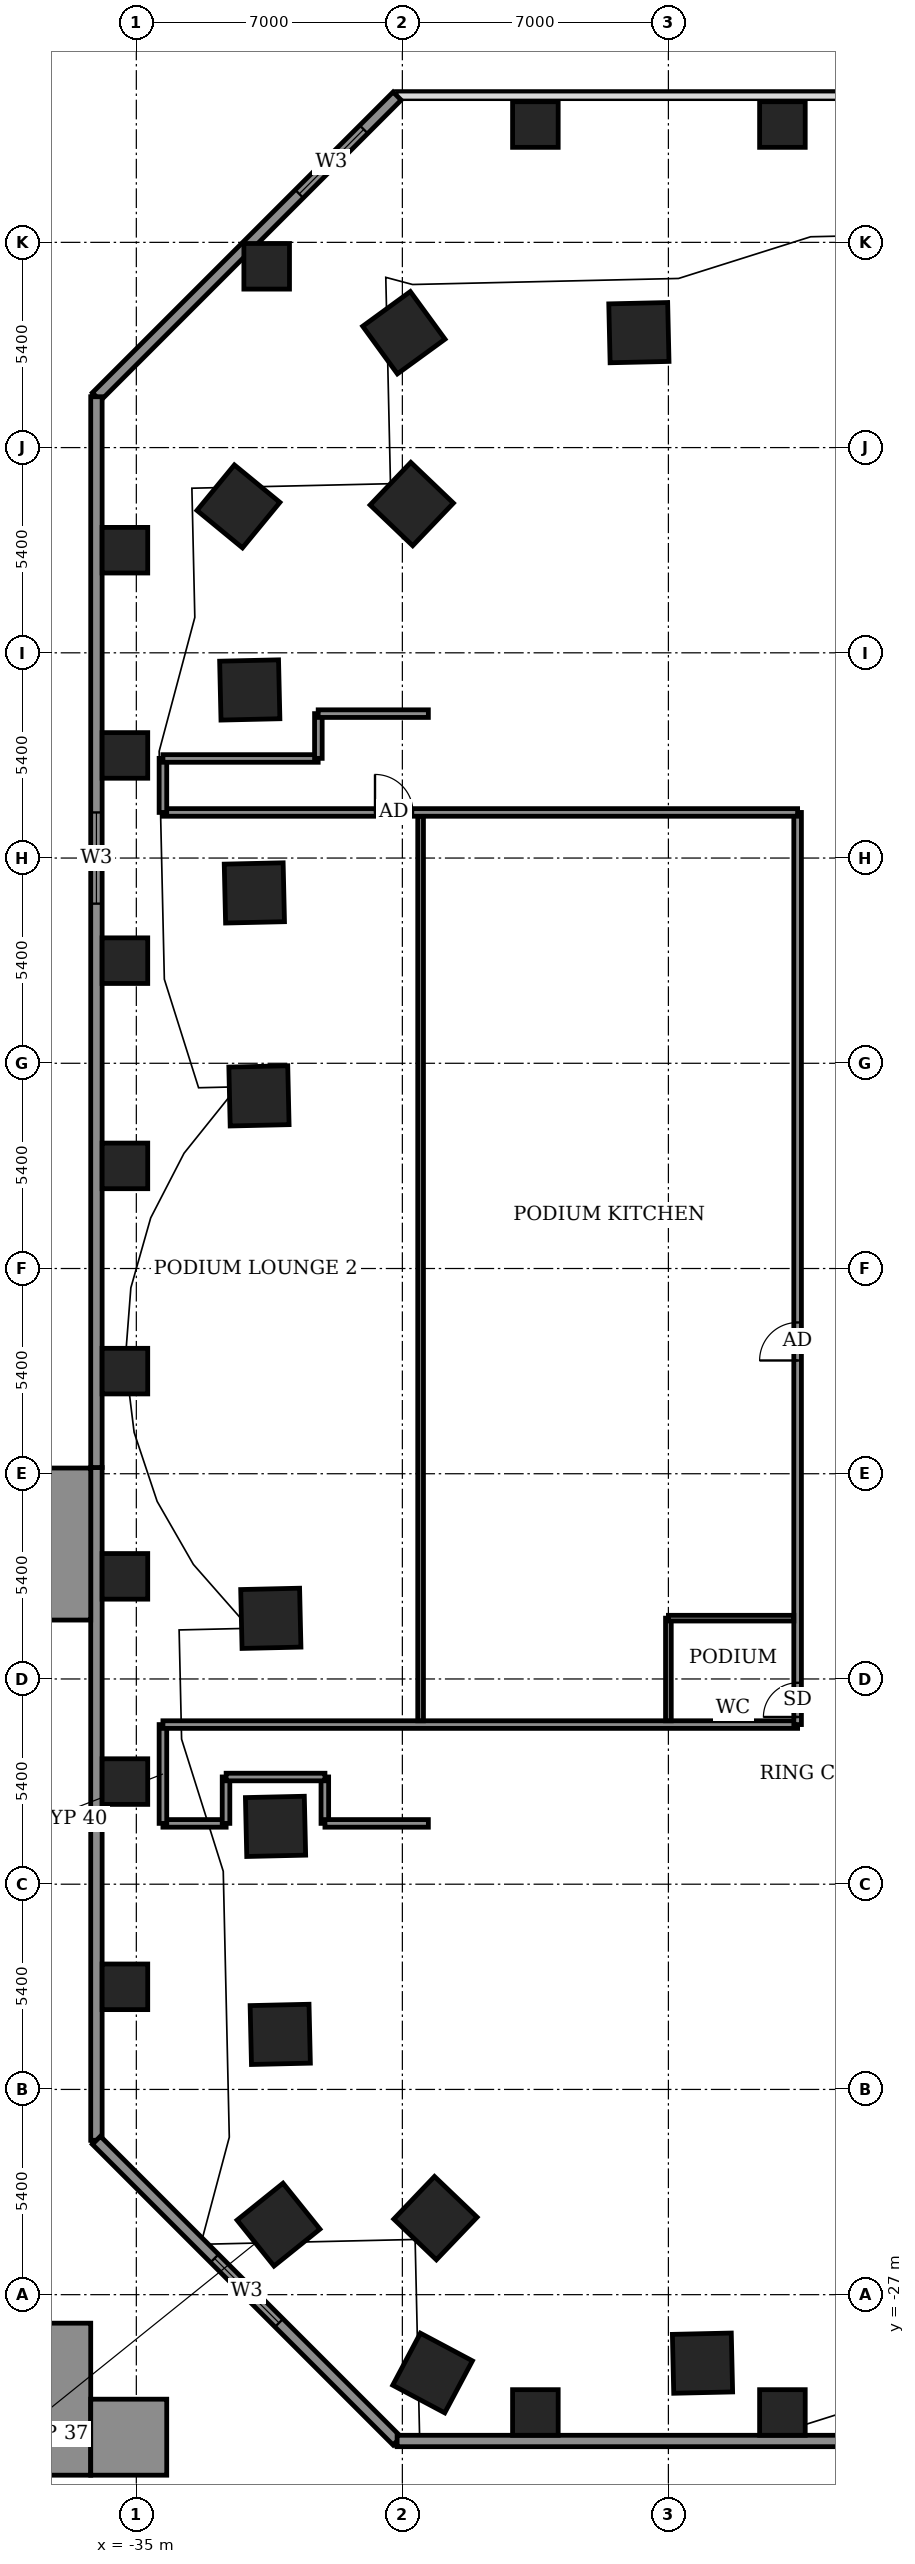
"""IFC4 building model, lengths in metres.
Left out: names, types, materials, properties, quantities, classifications, styles, units other than length and angle.
Written with IfcOpenShell. Run it as: python <this file> out.ifc"""

import sys

from ifc_helpers import new_model, si_unit, direction, frame, frame_2d, origin, origin_2d, place, context, subcontext, project, spatial, rectangle, extrude, element, fill, save


model = new_model("IFC4")
c1 = context("Model", 3, precision=1e-05, world=origin(), true_north=direction((0.0, 1.0)))
c2 = subcontext(c1, "Body", "Model", "MODEL_VIEW")
j1 = project(units=[si_unit("LENGTHUNIT", "METRE"), si_unit("PLANEANGLEUNIT", "RADIAN")], contexts=[c1])
p1 = place(None, origin())
s1 = spatial("IfcSite", under=j1, at=p1, CompositionType="ELEMENT")
p2 = place(p1, origin())
s2 = spatial("IfcBuilding", under=s1, at=p2, CompositionType="ELEMENT")
p3 = place(p2, frame((0.0, 0.0, 25.0)))
s3 = spatial("IfcBuildingStorey", under=s2, at=p3, CompositionType="ELEMENT", Elevation=25.0)
for number, where, z_axis, x_axis in (
    (1, (-31.461, -9.204, -0.55), (0.0, 0.0, 1.0), (0.023, -1.0, 0.0)),
    (2, (-31.337, -14.678, -0.55), (0.0, 0.0, 1.0), (0.023, -1.0, 0.0)),
    (3, (-31.213, -20.151, -0.55), (0.0, 0.0, 1.0), (0.023, -1.0, 0.0)),
    (4, (-31.259, -25.157, -0.55), (0.0, 0.0, 1.0), (0.627, -0.779, 0.0)),
    (5, (-27.13, -24.987, -0.55), (0.0, 0.0, 1.0), (0.723, -0.691, 0.0)),
    (6, (-27.205, -29.062, -0.55), (0.0, 0.0, 1.0), (0.883, -0.469, 0.0)),
    (7, (-20.103, -28.802, -0.55), (0.0, 0.0, 1.0), (1.0, 0.023, 0.0)),
    (8, (-21.776, 24.624, -0.55), (0.0, 0.0, 1.0), (-1.0, -0.023, 0.0)),
    (9, (-27.961, 24.623, -0.55), (0.0, 0.0, 1.0), (-0.808, -0.589, 0.0)),
    (10, (-27.753, 20.115, -0.55), (0.0, 0.0, 1.0), (-0.691, -0.723, 0.0)),
    (11, (-32.313, 20.053, -0.55), (0.0, 0.0, 1.0), (-0.635, -0.772, 0.0)),
    (12, (-32.015, 15.223, -0.55), (0.0, 0.0, 1.0), (0.023, -1.0, 0.0)),
    (13, (-31.894, 9.883, -0.55), (0.0, 0.0, 1.0), (0.023, -1.0, 0.0)),
    (14, (-31.773, 4.542, -0.55), (0.0, 0.0, 1.0), (0.023, -1.0, 0.0)),
):
    element("IfcColumn", number, at=place(p3, frame(where, z_axis=z_axis, x_axis=x_axis)), inside=s3, PredefinedType="COLUMN", context=c2, shape_type="SweptSolid", body=[
        extrude(rectangle(XDim=1.55, YDim=1.55, at=origin_2d()), origin(), (0.0, 0.0, 1.0), 4.5),
    ])
for number, where, z_axis, x_axis in (
    (15, (-24.5, -30.1, -0.55), (0.0, 0.0, 1.0), (1.0, 0.0, 0.0)),
    (16, (-24.5, 30.1, -0.55), (0.0, 0.0, 1.0), (1.0, 0.0, 0.0)),
    (17, (-18.0, -30.1, -0.55), (0.0, 0.0, 1.0), (1.0, 0.0, 0.0)),
    (18, (-18.0, 30.1, -0.55), (0.0, 0.0, 1.0), (1.0, 0.0, 0.0)),
    (19, (-35.3, -18.9, -0.55), (0.0, 0.0, 1.0), (1.0, 0.0, 0.0)),
    (20, (-35.3, -13.5, -0.55), (0.0, 0.0, 1.0), (1.0, 0.0, 0.0)),
    (21, (-35.3, -8.1, -0.55), (0.0, 0.0, 1.0), (1.0, 0.0, 0.0)),
    (22, (-35.3, -2.7, -0.55), (0.0, 0.0, 1.0), (1.0, 0.0, 0.0)),
    (23, (-35.3, 2.7, -0.55), (0.0, 0.0, 1.0), (1.0, 0.0, 0.0)),
    (24, (-35.3, 8.1, -0.55), (0.0, 0.0, 1.0), (1.0, 0.0, 0.0)),
    (25, (-35.3, 13.5, -0.55), (0.0, 0.0, 1.0), (1.0, 0.0, 0.0)),
    (26, (-35.3, 18.9, -0.55), (0.0, 0.0, 1.0), (1.0, 0.0, 0.0)),
    (27, (-31.57, 26.37, -0.55), (0.0, 0.0, 1.0), (1.0, 0.0, 0.0)),
):
    element("IfcColumn", number, at=place(p3, frame(where, z_axis=z_axis, x_axis=x_axis)), inside=s3, PredefinedType="COLUMN", context=c2, shape_type="SweptSolid", body=[
        extrude(rectangle(XDim=1.2, YDim=1.2, at=origin_2d()), origin(), (0.0, 0.0, 1.0), 4.5),
    ])
p4 = place(p3, frame((-28.138, 30.85, 0.0), z_axis=(0.0, 0.0, 1.0), x_axis=(-0.707106781187, -0.707106781187, 0.0)))
e28 = element("IfcWall", 28, at=p4, inside=s3, PredefinedType="SOLIDWALL", context=c2, shape_type="SweptSolid", body=[
    extrude(rectangle(XDim=11.189, YDim=0.3, at=frame_2d((5.595, 0.0))), origin(), (0.0, 0.0, 1.0), 3.95),
])
p5 = place(p4, frame((1.242, 0.0, 0.9)))
e29 = element("IfcOpeningElement", 29, at=p5, cuts=e28, PredefinedType="OPENING", context=c2, shape_type="SweptSolid", body=[
    extrude(rectangle(XDim=2.4, YDim=1.8, at=frame_2d((1.2, 0.9))), frame((0.0, 0.16, 0.0), z_axis=(0.0, -1.0, 0.0), x_axis=(1.0, 0.0, 0.0)), (0.0, 0.0, 1.0), 0.32),
])
p6 = place(p3, frame((-36.05, -5.236, 0.0), z_axis=(0.0, 0.0, 1.0), x_axis=(0.0, -1.0, 0.0)))
e30 = element("IfcWall", 30, at=p6, inside=s3, PredefinedType="SOLIDWALL", context=c2, shape_type="SweptSolid", body=[
    extrude(rectangle(XDim=17.702, YDim=0.3, at=frame_2d((8.851, 0.0))), origin(), (0.0, 0.0, 1.0), 3.95),
])
p7 = place(p3, frame((-36.05, 22.938, 0.0), z_axis=(0.0, 0.0, 1.0), x_axis=(0.0, -1.0, 0.0)))
e31 = element("IfcWall", 31, at=p7, inside=s3, PredefinedType="SOLIDWALL", context=c2, shape_type="SweptSolid", body=[
    extrude(rectangle(XDim=28.174, YDim=0.3, at=frame_2d((14.087, 0.0))), origin(), (0.0, 0.0, 1.0), 3.95),
])
p8 = place(p7, frame((10.938, 0.0, 0.9)))
e32 = element("IfcOpeningElement", 32, at=p8, cuts=e31, PredefinedType="OPENING", context=c2, shape_type="SweptSolid", body=[
    extrude(rectangle(XDim=2.4, YDim=1.8, at=frame_2d((1.2, 0.9))), frame((0.0, 0.16, 0.0), z_axis=(0.0, -1.0, 0.0), x_axis=(1.0, 0.0, 0.0)), (0.0, 0.0, 1.0), 0.32),
])
p9 = place(p3, frame((-36.05, -22.938, 0.0), z_axis=(0.0, 0.0, 1.0), x_axis=(0.707106781187, -0.707106781187, 0.0)))
e33 = element("IfcWall", 33, at=p9, inside=s3, PredefinedType="SOLIDWALL", context=c2, shape_type="SweptSolid", body=[
    extrude(rectangle(XDim=11.189, YDim=0.3, at=frame_2d((5.595, 0.0))), origin(), (0.0, 0.0, 1.0), 3.95),
])
p10 = place(p9, frame((4.395, 0.0, 0.9)))
e34 = element("IfcOpeningElement", 34, at=p10, cuts=e33, PredefinedType="OPENING", context=c2, shape_type="SweptSolid", body=[
    extrude(rectangle(XDim=2.4, YDim=1.8, at=frame_2d((1.2, 0.9))), frame((0.0, 0.16, 0.0), z_axis=(0.0, -1.0, 0.0), x_axis=(1.0, 0.0, 0.0)), (0.0, 0.0, 1.0), 0.32),
])
p11 = place(p3, frame((-28.138, -30.85, 0.0), z_axis=(0.0, 0.0, 1.0), x_axis=(1.0, 0.0, 0.0)))
e35 = element("IfcWall", 35, at=p11, inside=s3, PredefinedType="SOLIDWALL", context=c2, shape_type="SweptSolid", body=[
    extrude(rectangle(XDim=56.276, YDim=0.3, at=frame_2d((28.138, 0.0))), origin(), (0.0, 0.0, 1.0), 3.95),
])
p12 = place(p11, frame((14.948, 0.0, 0.9)))
e36 = element("IfcOpeningElement", 36, at=p12, cuts=e35, PredefinedType="OPENING", context=c2, shape_type="SweptSolid", body=[
    extrude(rectangle(XDim=2.4, YDim=1.8, at=frame_2d((1.2, 0.9))), frame((0.0, 0.16, 0.0), z_axis=(0.0, -1.0, 0.0), x_axis=(1.0, 0.0, 0.0)), (0.0, 0.0, 1.0), 0.32),
])
p13 = place(p11, frame((21.813, 0.0, 0.9)))
e37 = element("IfcOpeningElement", 37, at=p13, cuts=e35, PredefinedType="OPENING", context=c2, shape_type="SweptSolid", body=[
    extrude(rectangle(XDim=2.4, YDim=1.8, at=frame_2d((1.2, 0.9))), frame((0.0, 0.16, 0.0), z_axis=(0.0, -1.0, 0.0), x_axis=(1.0, 0.0, 0.0)), (0.0, 0.0, 1.0), 0.32),
])
p14 = place(p11, frame((30.373, 0.0, 0.9)))
e38 = element("IfcOpeningElement", 38, at=p14, cuts=e35, PredefinedType="OPENING", context=c2, shape_type="SweptSolid", body=[
    extrude(rectangle(XDim=2.4, YDim=1.8, at=frame_2d((1.2, 0.9))), frame((0.0, 0.16, 0.0), z_axis=(0.0, -1.0, 0.0), x_axis=(1.0, 0.0, 0.0)), (0.0, 0.0, 1.0), 0.32),
])
p15 = place(p11, frame((40.263, 0.0, 0.9)))
e39 = element("IfcOpeningElement", 39, at=p15, cuts=e35, PredefinedType="OPENING", context=c2, shape_type="SweptSolid", body=[
    extrude(rectangle(XDim=2.4, YDim=1.8, at=frame_2d((1.2, 0.9))), frame((0.0, 0.16, 0.0), z_axis=(0.0, -1.0, 0.0), x_axis=(1.0, 0.0, 0.0)), (0.0, 0.0, 1.0), 0.32),
])
p16 = place(p11, frame((53.553, 0.0, 0.9)))
e40 = element("IfcOpeningElement", 40, at=p16, cuts=e35, PredefinedType="OPENING", context=c2, shape_type="SweptSolid", body=[
    extrude(rectangle(XDim=2.4, YDim=1.8, at=frame_2d((1.2, 0.9))), frame((0.0, 0.16, 0.0), z_axis=(0.0, -1.0, 0.0), x_axis=(1.0, 0.0, 0.0)), (0.0, 0.0, 1.0), 0.32),
])
for number, where, z_axis, x_axis in (
    (41, (-37.45, -31.75, 0.0), (0.0, 0.0, 1.0), (0.0, 1.0, 0.0)),
    (42, (-37.45, -9.25, 0.0), (0.0, 0.0, 1.0), (0.0, 1.0, 0.0)),
):
    element("IfcWall", number, at=place(p3, frame(where, z_axis=z_axis, x_axis=x_axis)), inside=s3, PredefinedType="STANDARD", context=c2, shape_type="SweptSolid", body=[
        extrude(rectangle(XDim=4.0, YDim=2.5, at=frame_2d((2.0, 0.0))), origin(), (0.0, 0.0, 1.0), 4.5),
    ])
p17 = place(p3, frame((-34.2, -30.75, 0.0), z_axis=(0.0, 0.0, 1.0), x_axis=(-1.0, 0.0, 0.0)))
e43 = element("IfcWall", 43, at=p17, inside=s3, PredefinedType="STANDARD", context=c2, shape_type="SweptSolid", body=[
    extrude(rectangle(XDim=2.0, YDim=2.0, at=frame_2d((1.0, 0.0))), origin(), (0.0, 0.0, 1.0), 4.5),
])
p18 = place(p3, frame((-34.3, -14.6, 0.0), z_axis=(0.0, 0.0, 1.0), x_axis=(1.0, 0.0, 0.0)))
e44 = element("IfcWall", 44, at=p18, inside=s3, PredefinedType="PARTITIONING", context=c2, shape_type="SweptSolid", body=[
    extrude(rectangle(XDim=1.663, YDim=0.2, at=frame_2d((0.832, 0.0))), origin(), (0.0, 0.0, 1.0), 3.95),
])
p19 = place(p3, frame((-34.3, -14.6, 0.0), z_axis=(0.0, 0.0, 1.0), x_axis=(0.0, 1.0, 0.0)))
e45 = element("IfcWall", 45, at=p19, inside=s3, PredefinedType="PARTITIONING", context=c2, shape_type="SweptSolid", body=[
    extrude(rectangle(XDim=2.6, YDim=0.2, at=frame_2d((1.3, 0.0))), origin(), (0.0, 0.0, 1.0), 3.95),
])
for number, where, z_axis, x_axis in (
    (46, (-32.64, -14.6, 0.0), (0.0, 0.0, 1.0), (0.0, 1.0, 0.0)),
    (47, (-30.04, -14.6, 0.0), (0.0, 0.0, 1.0), (0.0, 1.0, 0.0)),
):
    element("IfcWall", number, at=place(p3, frame(where, z_axis=z_axis, x_axis=x_axis)), inside=s3, PredefinedType="PARTITIONING", context=c2, shape_type="SweptSolid", body=[
        extrude(rectangle(XDim=1.222, YDim=0.2, at=frame_2d((0.611, 0.0))), origin(), (0.0, 0.0, 1.0), 3.95),
    ])
p20 = place(p3, frame((-30.037, -14.6, 0.0), z_axis=(0.0, 0.0, 1.0), x_axis=(1.0, 0.0, 0.0)))
e48 = element("IfcWall", 48, at=p20, inside=s3, PredefinedType="PARTITIONING", context=c2, shape_type="SweptSolid", body=[
    extrude(rectangle(XDim=2.721, YDim=0.2, at=frame_2d((1.361, 0.0))), origin(), (0.0, 0.0, 1.0), 3.95),
])
p21 = place(p3, frame((-32.637, -13.38, 0.0), z_axis=(0.0, 0.0, 1.0), x_axis=(1.0, 0.0, 0.0)))
e49 = element("IfcWall", 49, at=p21, inside=s3, PredefinedType="PARTITIONING", context=c2, shape_type="SweptSolid", body=[
    extrude(rectangle(XDim=2.6, YDim=0.2, at=frame_2d((1.3, 0.0))), origin(), (0.0, 0.0, 1.0), 3.95),
])
p22 = place(p3, frame((-34.3, -12.0, 0.0), z_axis=(0.0, 0.0, 1.0), x_axis=(1.0, 0.0, 0.0)))
e50 = element("IfcWall", 50, at=p22, inside=s3, PredefinedType="PARTITIONING", context=c2, shape_type="SweptSolid", body=[
    extrude(rectangle(XDim=16.7, YDim=0.2, at=frame_2d((8.35, 0.0))), origin(), (0.0, 0.0, 1.0), 3.95),
])
p23 = place(p3, frame((-27.52, -11.9, 0.0), z_axis=(0.0, 0.0, 1.0), x_axis=(0.0, 1.0, 0.0)))
e51 = element("IfcWall", 51, at=p23, inside=s3, PredefinedType="PARTITIONING", context=c2, shape_type="SweptSolid", body=[
    extrude(rectangle(XDim=23.8, YDim=0.15, at=frame_2d((11.9, 0.0))), origin(), (0.0, 0.0, 1.0), 3.95),
])
p24 = place(p3, frame((-21.0, -11.9, 0.0), z_axis=(0.0, 0.0, 1.0), x_axis=(0.0, 1.0, 0.0)))
e52 = element("IfcWall", 52, at=p24, inside=s3, PredefinedType="PARTITIONING", context=c2, shape_type="SweptSolid", body=[
    extrude(rectangle(XDim=2.7, YDim=0.15, at=frame_2d((1.35, 0.0))), origin(), (0.0, 0.0, 1.0), 3.95),
])
p25 = place(p3, frame((-17.6, -12.0, 0.0), z_axis=(0.0, 0.0, 1.0), x_axis=(0.0, 1.0, 0.0)))
e53 = element("IfcWall", 53, at=p25, inside=s3, PredefinedType="PARTITIONING", context=c2, shape_type="SweptSolid", body=[
    extrude(rectangle(XDim=24.0, YDim=0.2, at=frame_2d((12.0, 0.0))), origin(), (0.0, 0.0, 1.0), 3.95),
])
p26 = place(p25, frame((9.58, 0.0, 0.0)))
e54 = element("IfcOpeningElement", 54, at=p26, cuts=e53, PredefinedType="OPENING", context=c2, shape_type="SweptSolid", body=[
    extrude(rectangle(XDim=1.0, YDim=2.1, at=frame_2d((0.5, 1.05))), frame((0.0, 0.11, 0.0), z_axis=(0.0, -1.0, 0.0), x_axis=(1.0, 0.0, 0.0)), (0.0, 0.0, 1.0), 0.22),
])
p27 = place(p25, frame((0.2, 0.0, 0.0)))
e55 = element("IfcOpeningElement", 55, at=p27, cuts=e53, PredefinedType="OPENING", context=c2, shape_type="SweptSolid", body=[
    extrude(rectangle(XDim=0.9, YDim=2.1, at=frame_2d((0.45, 1.05))), frame((0.0, 0.11, 0.0), z_axis=(0.0, -1.0, 0.0), x_axis=(1.0, 0.0, 0.0)), (0.0, 0.0, 1.0), 0.22),
])
p28 = place(p3, frame((-21.0, -9.2, 0.0), z_axis=(0.0, 0.0, 1.0), x_axis=(1.0, 0.0, 0.0)))
e56 = element("IfcWall", 56, at=p28, inside=s3, PredefinedType="PARTITIONING", context=c2, shape_type="SweptSolid", body=[
    extrude(rectangle(XDim=3.3, YDim=0.15, at=frame_2d((1.65, 0.0))), origin(), (0.0, 0.0, 1.0), 3.95),
])
p29 = place(p3, frame((-34.3, 12.0, 0.0), z_axis=(0.0, 0.0, 1.0), x_axis=(1.0, 0.0, 0.0)))
e57 = element("IfcWall", 57, at=p29, inside=s3, PredefinedType="PARTITIONING", context=c2, shape_type="SweptSolid", body=[
    extrude(rectangle(XDim=16.7, YDim=0.2, at=frame_2d((8.35, 0.0))), origin(), (0.0, 0.0, 1.0), 3.95),
])
p30 = place(p29, frame((5.58, 0.0, 0.0)))
e58 = element("IfcOpeningElement", 58, at=p30, cuts=e57, PredefinedType="OPENING", context=c2, shape_type="SweptSolid", body=[
    extrude(rectangle(XDim=1.0, YDim=2.1, at=frame_2d((0.5, 1.05))), frame((0.0, 0.11, 0.0), z_axis=(0.0, -1.0, 0.0), x_axis=(1.0, 0.0, 0.0)), (0.0, 0.0, 1.0), 0.22),
])
p31 = place(p3, frame((-34.3, 12.0, 0.0), z_axis=(0.0, 0.0, 1.0), x_axis=(0.0, 1.0, 0.0)))
e59 = element("IfcWall", 59, at=p31, inside=s3, PredefinedType="PARTITIONING", context=c2, shape_type="SweptSolid", body=[
    extrude(rectangle(XDim=1.423, YDim=0.2, at=frame_2d((0.711, 0.0))), origin(), (0.0, 0.0, 1.0), 3.95),
])
p32 = place(p3, frame((-34.3, 13.42, 0.0), z_axis=(0.0, 0.0, 1.0), x_axis=(1.0, 0.0, 0.0)))
e60 = element("IfcWall", 60, at=p32, inside=s3, PredefinedType="PARTITIONING", context=c2, shape_type="SweptSolid", body=[
    extrude(rectangle(XDim=4.085, YDim=0.2, at=frame_2d((2.042, 0.0))), origin(), (0.0, 0.0, 1.0), 3.95),
])
p33 = place(p3, frame((-30.21, 13.423, 0.0), z_axis=(0.0, 0.0, 1.0), x_axis=(0.0, 1.0, 0.0)))
e61 = element("IfcWall", 61, at=p33, inside=s3, PredefinedType="PARTITIONING", context=c2, shape_type="SweptSolid", body=[
    extrude(rectangle(XDim=1.177, YDim=0.2, at=frame_2d((0.588, 0.0))), origin(), (0.0, 0.0, 1.0), 3.95),
])
p34 = place(p3, frame((-30.215, 14.6, 0.0), z_axis=(0.0, 0.0, 1.0), x_axis=(1.0, 0.0, 0.0)))
e62 = element("IfcWall", 62, at=p34, inside=s3, PredefinedType="PARTITIONING", context=c2, shape_type="SweptSolid", body=[
    extrude(rectangle(XDim=2.899, YDim=0.2, at=frame_2d((1.45, 0.0))), origin(), (0.0, 0.0, 1.0), 3.95),
])
p35 = place(p5, origin())
e63 = element("IfcWindow", 63, at=p35, inside=s3, PartitioningType="DOUBLE_PANEL_VERTICAL", PredefinedType="WINDOW", context=c2, shape_type="SweptSolid", body=[
    extrude(rectangle(XDim=2.4, YDim=1.8, at=frame_2d((1.2, 0.9))), frame((0.0, 0.03, 0.0), z_axis=(0.0, -1.0, 0.0), x_axis=(1.0, 0.0, 0.0)), (0.0, 0.0, 1.0), 0.06),
])
fill(e29, e63)
p36 = place(p8, origin())
e64 = element("IfcWindow", 64, at=p36, inside=s3, PartitioningType="DOUBLE_PANEL_VERTICAL", PredefinedType="WINDOW", context=c2, shape_type="SweptSolid", body=[
    extrude(rectangle(XDim=2.4, YDim=1.8, at=frame_2d((1.2, 0.9))), frame((0.0, 0.03, 0.0), z_axis=(0.0, -1.0, 0.0), x_axis=(1.0, 0.0, 0.0)), (0.0, 0.0, 1.0), 0.06),
])
fill(e32, e64)
p37 = place(p10, origin())
e65 = element("IfcWindow", 65, at=p37, inside=s3, PartitioningType="DOUBLE_PANEL_VERTICAL", PredefinedType="WINDOW", context=c2, shape_type="SweptSolid", body=[
    extrude(rectangle(XDim=2.4, YDim=1.8, at=frame_2d((1.2, 0.9))), frame((0.0, 0.03, 0.0), z_axis=(0.0, -1.0, 0.0), x_axis=(1.0, 0.0, 0.0)), (0.0, 0.0, 1.0), 0.06),
])
fill(e34, e65)
p38 = place(p30, origin())
e66 = element("IfcDoor", 66, at=p38, inside=s3, OperationType="SINGLE_SWING_LEFT", PredefinedType="DOOR", context=c2, shape_type="SweptSolid", body=[
    extrude(rectangle(XDim=1.0, YDim=2.1, at=frame_2d((0.5, 1.05))), frame((0.0, 0.025, 0.0), z_axis=(0.0, -1.0, 0.0), x_axis=(1.0, 0.0, 0.0)), (0.0, 0.0, 1.0), 0.05),
])
fill(e58, e66)
p39 = place(p26, origin())
e67 = element("IfcDoor", 67, at=p39, inside=s3, OperationType="SINGLE_SWING_RIGHT", PredefinedType="DOOR", context=c2, shape_type="SweptSolid", body=[
    extrude(rectangle(XDim=1.0, YDim=2.1, at=frame_2d((0.5, 1.05))), frame((0.0, 0.025, 0.0), z_axis=(0.0, -1.0, 0.0), x_axis=(1.0, 0.0, 0.0)), (0.0, 0.0, 1.0), 0.05),
])
fill(e54, e67)
p40 = place(p27, origin())
e68 = element("IfcDoor", 68, at=p40, inside=s3, OperationType="SINGLE_SWING_RIGHT", PredefinedType="DOOR", context=c2, shape_type="SweptSolid", body=[
    extrude(rectangle(XDim=0.9, YDim=2.1, at=frame_2d((0.45, 1.05))), frame((0.0, 0.025, 0.0), z_axis=(0.0, -1.0, 0.0), x_axis=(1.0, 0.0, 0.0)), (0.0, 0.0, 1.0), 0.05),
])
fill(e55, e68)
save(model, sys.argv[1])
